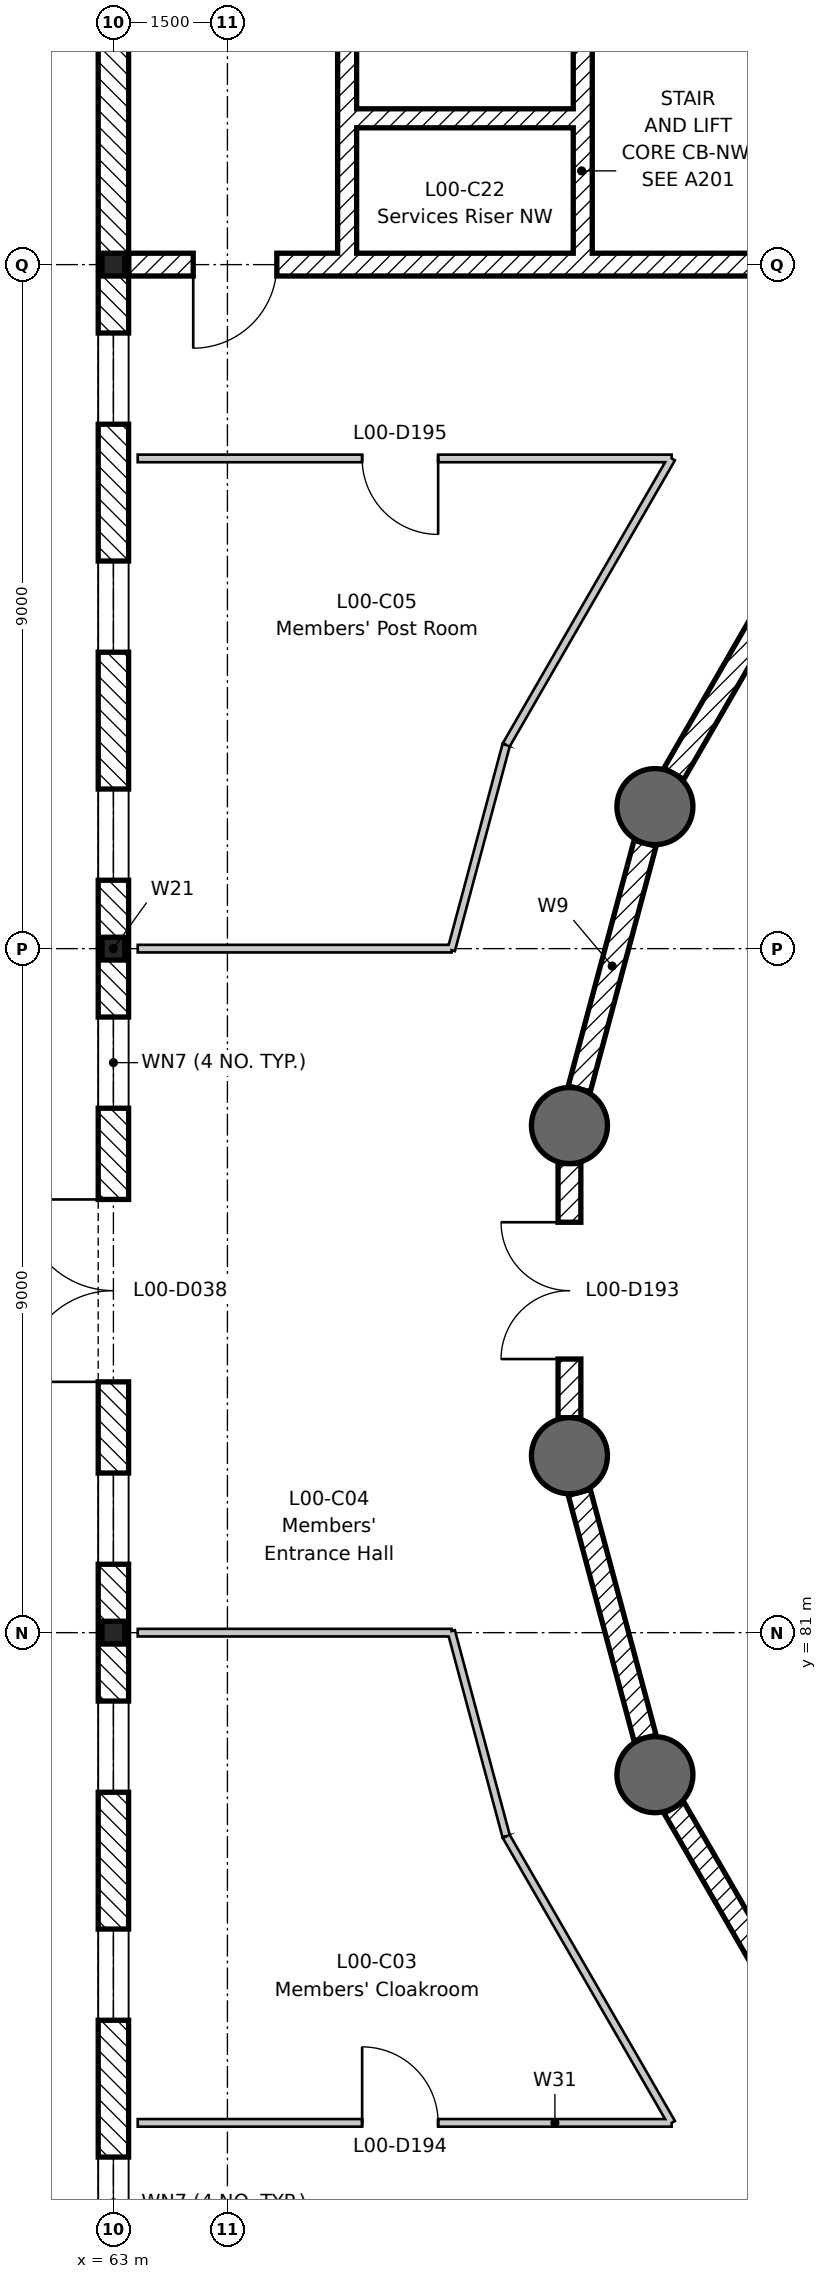
"""IFC4 building model, lengths in metres.
Left out: names, types, materials, properties, quantities, classifications, styles, units other than length and angle.
Written with IfcOpenShell. Run it as: python <this file> out.ifc"""

import sys

from ifc_helpers import new_model, si_unit, direction, frame, frame_2d, origin, origin_2d, place, context, subcontext, project, spatial, rectangle, circle, i_section, extrude, element, fill, save


model = new_model("IFC4")
c1 = context("Model", 3, precision=1e-05, world=origin(), true_north=direction((0.0, 1.0)))
c2 = subcontext(c1, "Body", "Model", "MODEL_VIEW")
j1 = project(units=[si_unit("LENGTHUNIT", "METRE"), si_unit("PLANEANGLEUNIT", "RADIAN")], contexts=[c1])
p1 = place(None, origin())
s1 = spatial("IfcSite", under=j1, at=p1, CompositionType="ELEMENT")
p2 = place(p1, origin())
s2 = spatial("IfcBuilding", under=s1, at=p2, CompositionType="ELEMENT")
p3 = place(p2, origin())
s3 = spatial("IfcBuildingStorey", under=s2, at=p3, CompositionType="ELEMENT", Elevation=0.0)
for number, where, z_axis, x_axis in (
    (1, (70.125, 91.869, -0.6), (0.0, 0.0, 1.0), (1.0, 0.0, 0.0)),
    (2, (69.0, 87.672, -0.6), (0.0, 0.0, 1.0), (1.0, 0.0, 0.0)),
    (3, (69.0, 83.328, -0.6), (0.0, 0.0, 1.0), (1.0, 0.0, 0.0)),
    (4, (70.125, 79.131, -0.6), (0.0, 0.0, 1.0), (1.0, 0.0, 0.0)),
):
    element("IfcColumn", number, at=place(p3, frame(where, z_axis=z_axis, x_axis=x_axis)), inside=s3, PredefinedType="COLUMN", context=c2, shape_type="SweptSolid", body=[
        extrude(circle(Radius=0.5, at=origin_2d()), origin(), (0.0, 0.0, 1.0), 5.8),
    ])
for number, where, z_axis, x_axis in (
    (5, (63.0, 81.0, -0.6), (0.0, 0.0, 1.0), (1.0, 0.0, 0.0)),
    (6, (63.0, 90.0, -0.6), (0.0, 0.0, 1.0), (1.0, 0.0, 0.0)),
    (7, (63.0, 99.0, -0.6), (0.0, 0.0, 1.0), (1.0, 0.0, 0.0)),
):
    element("IfcColumn", number, at=place(p3, frame(where, z_axis=z_axis, x_axis=x_axis)), inside=s3, PredefinedType="COLUMN", context=c2, shape_type="SweptSolid", body=[
        extrude(i_section(OverallWidth=0.3, OverallDepth=0.3, WebThickness=0.011, FlangeThickness=0.019, FilletRadius=0.027, at=origin_2d()), origin(), (0.0, 0.0, 1.0), 5.8),
    ])
for number, where, z_axis, x_axis in (
    (8, (72.047, 95.198, 0.0), (0.0, 0.0, 1.0), (-0.5, -0.866, 0.0)),
    (9, (69.995, 91.386, 0.0), (0.0, 0.0, 1.0), (-0.259, -0.966, 0.0)),
):
    element("IfcWall", number, at=place(p3, frame(where, z_axis=z_axis, x_axis=x_axis)), inside=s3, PredefinedType="PARTITIONING", context=c2, shape_type="SweptSolid", body=[
        extrude(rectangle(XDim=3.344, YDim=0.3, at=frame_2d((1.672, 0.0))), origin(), (0.0, 0.0, 1.0), 4.91),
    ])
p4 = place(p3, frame((69.0, 87.172, 0.0), z_axis=(0.0, 0.0, 1.0), x_axis=(0.0, -1.0, 0.0)))
e10 = element("IfcWall", 10, at=p4, inside=s3, PredefinedType="PARTITIONING", context=c2, shape_type="SweptSolid", body=[
    extrude(rectangle(XDim=3.345, YDim=0.3, at=frame_2d((1.672, 0.0))), origin(), (0.0, 0.0, 1.0), 4.91),
])
p5 = place(p4, frame((0.772, 0.0, 0.0)))
e11 = element("IfcOpeningElement", 11, at=p5, cuts=e10, PredefinedType="OPENING", context=c2, shape_type="SweptSolid", body=[
    extrude(rectangle(XDim=1.8, YDim=2.4, at=frame_2d((0.9, 1.2))), frame((0.0, 0.16, 0.0), z_axis=(0.0, -1.0, 0.0), x_axis=(1.0, 0.0, 0.0)), (0.0, 0.0, 1.0), 0.32),
])
for number, where, z_axis, x_axis in (
    (12, (69.129, 82.845, 0.0), (0.0, 0.0, 1.0), (0.259, -0.966, 0.0)),
    (13, (70.375, 78.698, 0.0), (0.0, 0.0, 1.0), (0.5, -0.866, 0.0)),
):
    element("IfcWall", number, at=place(p3, frame(where, z_axis=z_axis, x_axis=x_axis)), inside=s3, PredefinedType="PARTITIONING", context=c2, shape_type="SweptSolid", body=[
        extrude(rectangle(XDim=3.344, YDim=0.3, at=frame_2d((1.672, 0.0))), origin(), (0.0, 0.0, 1.0), 4.91),
    ])
p6 = place(p3, frame((63.2, 99.0, 0.0), z_axis=(0.0, 0.0, 1.0), x_axis=(1.0, 0.0, 0.0)))
e14 = element("IfcWall", 14, at=p6, inside=s3, PredefinedType="SHEAR", context=c2, shape_type="SweptSolid", body=[
    extrude(rectangle(XDim=8.95, YDim=0.3, at=frame_2d((4.475, 0.0))), origin(), (0.0, 0.0, 1.0), 5.2),
])
p7 = place(p6, frame((0.85, 0.0, 0.0)))
e15 = element("IfcOpeningElement", 15, at=p7, cuts=e14, PredefinedType="OPENING", context=c2, shape_type="SweptSolid", body=[
    extrude(rectangle(XDim=1.1, YDim=2.1, at=frame_2d((0.55, 1.05))), frame((0.0, 0.16, 0.0), z_axis=(0.0, -1.0, 0.0), x_axis=(1.0, 0.0, 0.0)), (0.0, 0.0, 1.0), 0.32),
])
p8 = place(p3, frame((66.075, 107.8, 0.0), z_axis=(0.0, 0.0, 1.0), x_axis=(0.0, -1.0, 0.0)))
e16 = element("IfcWall", 16, at=p8, inside=s3, PredefinedType="SHEAR", context=c2, shape_type="SweptSolid", body=[
    extrude(rectangle(XDim=8.65, YDim=0.25, at=frame_2d((4.325, 0.0))), origin(), (0.0, 0.0, 1.0), 5.2),
])
p9 = place(p8, frame((0.4, 0.0, 0.0)))
e17 = element("IfcOpeningElement", 17, at=p9, cuts=e16, PredefinedType="OPENING", context=c2, shape_type="SweptSolid", body=[
    extrude(rectangle(XDim=1.0, YDim=2.1, at=frame_2d((0.5, 1.05))), frame((0.0, 0.135, 0.0), z_axis=(0.0, -1.0, 0.0), x_axis=(1.0, 0.0, 0.0)), (0.0, 0.0, 1.0), 0.27),
])
p10 = place(p3, frame((69.175, 107.8, 0.0), z_axis=(0.0, 0.0, 1.0), x_axis=(0.0, -1.0, 0.0)))
e18 = element("IfcWall", 18, at=p10, inside=s3, PredefinedType="SHEAR", context=c2, shape_type="SweptSolid", body=[
    extrude(rectangle(XDim=8.65, YDim=0.25, at=frame_2d((4.325, 0.0))), origin(), (0.0, 0.0, 1.0), 5.2),
])
p11 = place(p3, frame((66.2, 100.925, 0.0), z_axis=(0.0, 0.0, 1.0), x_axis=(1.0, 0.0, 0.0)))
e19 = element("IfcWall", 19, at=p11, inside=s3, PredefinedType="SHEAR", context=c2, shape_type="SweptSolid", body=[
    extrude(rectangle(XDim=2.85, YDim=0.25, at=frame_2d((1.425, 0.0))), origin(), (0.0, 0.0, 1.0), 5.2),
])
p12 = place(p3, frame((63.0, 72.0, 0.0), z_axis=(0.0, 0.0, 1.0), x_axis=(0.0, 1.0, 0.0)))
e20 = element("IfcWall", 20, at=p12, inside=s3, PredefinedType="STANDARD", context=c2, shape_type="SweptSolid", body=[
    extrude(rectangle(XDim=27.0, YDim=0.4, at=frame_2d((13.5, 0.0))), origin(), (0.0, 0.0, 1.0), 4.71),
])
p13 = place(p12, frame((12.3, 0.0, 0.0)))
e21 = element("IfcOpeningElement", 21, at=p13, cuts=e20, PredefinedType="OPENING", context=c2, shape_type="SweptSolid", body=[
    extrude(rectangle(XDim=2.4, YDim=2.4, at=frame_2d((1.2, 1.2))), frame((0.0, 0.21, 0.0), z_axis=(0.0, -1.0, 0.0), x_axis=(1.0, 0.0, 0.0)), (0.0, 0.0, 1.0), 0.42),
])
p14 = place(p12, frame((0.9, 0.0, 0.9)))
e22 = element("IfcOpeningElement", 22, at=p14, cuts=e20, PredefinedType="OPENING", context=c2, shape_type="SweptSolid", body=[
    extrude(rectangle(XDim=1.2, YDim=2.4, at=frame_2d((0.6, 1.2))), frame((0.0, 0.21, 0.0), z_axis=(0.0, -1.0, 0.0), x_axis=(1.0, 0.0, 0.0)), (0.0, 0.0, 1.0), 0.42),
])
p15 = place(p12, frame((3.9, 0.0, 0.9)))
e23 = element("IfcOpeningElement", 23, at=p15, cuts=e20, PredefinedType="OPENING", context=c2, shape_type="SweptSolid", body=[
    extrude(rectangle(XDim=1.2, YDim=2.4, at=frame_2d((0.6, 1.2))), frame((0.0, 0.21, 0.0), z_axis=(0.0, -1.0, 0.0), x_axis=(1.0, 0.0, 0.0)), (0.0, 0.0, 1.0), 0.42),
])
p16 = place(p12, frame((6.9, 0.0, 0.9)))
e24 = element("IfcOpeningElement", 24, at=p16, cuts=e20, PredefinedType="OPENING", context=c2, shape_type="SweptSolid", body=[
    extrude(rectangle(XDim=1.2, YDim=2.4, at=frame_2d((0.6, 1.2))), frame((0.0, 0.21, 0.0), z_axis=(0.0, -1.0, 0.0), x_axis=(1.0, 0.0, 0.0)), (0.0, 0.0, 1.0), 0.42),
])
p17 = place(p12, frame((9.9, 0.0, 0.9)))
e25 = element("IfcOpeningElement", 25, at=p17, cuts=e20, PredefinedType="OPENING", context=c2, shape_type="SweptSolid", body=[
    extrude(rectangle(XDim=1.2, YDim=2.4, at=frame_2d((0.6, 1.2))), frame((0.0, 0.21, 0.0), z_axis=(0.0, -1.0, 0.0), x_axis=(1.0, 0.0, 0.0)), (0.0, 0.0, 1.0), 0.42),
])
p18 = place(p12, frame((15.9, 0.0, 0.9)))
e26 = element("IfcOpeningElement", 26, at=p18, cuts=e20, PredefinedType="OPENING", context=c2, shape_type="SweptSolid", body=[
    extrude(rectangle(XDim=1.2, YDim=2.4, at=frame_2d((0.6, 1.2))), frame((0.0, 0.21, 0.0), z_axis=(0.0, -1.0, 0.0), x_axis=(1.0, 0.0, 0.0)), (0.0, 0.0, 1.0), 0.42),
])
p19 = place(p12, frame((18.9, 0.0, 0.9)))
e27 = element("IfcOpeningElement", 27, at=p19, cuts=e20, PredefinedType="OPENING", context=c2, shape_type="SweptSolid", body=[
    extrude(rectangle(XDim=1.2, YDim=2.4, at=frame_2d((0.6, 1.2))), frame((0.0, 0.21, 0.0), z_axis=(0.0, -1.0, 0.0), x_axis=(1.0, 0.0, 0.0)), (0.0, 0.0, 1.0), 0.42),
])
p20 = place(p12, frame((21.9, 0.0, 0.9)))
e28 = element("IfcOpeningElement", 28, at=p20, cuts=e20, PredefinedType="OPENING", context=c2, shape_type="SweptSolid", body=[
    extrude(rectangle(XDim=1.2, YDim=2.4, at=frame_2d((0.6, 1.2))), frame((0.0, 0.21, 0.0), z_axis=(0.0, -1.0, 0.0), x_axis=(1.0, 0.0, 0.0)), (0.0, 0.0, 1.0), 0.42),
])
p21 = place(p12, frame((24.9, 0.0, 0.9)))
e29 = element("IfcOpeningElement", 29, at=p21, cuts=e20, PredefinedType="OPENING", context=c2, shape_type="SweptSolid", body=[
    extrude(rectangle(XDim=1.2, YDim=2.4, at=frame_2d((0.6, 1.2))), frame((0.0, 0.21, 0.0), z_axis=(0.0, -1.0, 0.0), x_axis=(1.0, 0.0, 0.0)), (0.0, 0.0, 1.0), 0.42),
])
p22 = place(p3, frame((63.0, 99.0, 0.0), z_axis=(0.0, 0.0, 1.0), x_axis=(0.0, 1.0, 0.0)))
e30 = element("IfcWall", 30, at=p22, inside=s3, PredefinedType="STANDARD", context=c2, shape_type="SweptSolid", body=[
    extrude(rectangle(XDim=4.4, YDim=0.4, at=frame_2d((2.2, 0.0))), origin(), (0.0, 0.0, 1.0), 5.2),
])
p23 = place(p3, frame((67.45, 81.0, 0.0), z_axis=(0.0, 0.0, 1.0), x_axis=(-1.0, 0.0, 0.0)))
e31 = element("IfcWall", 31, at=p23, inside=s3, PredefinedType="PARTITIONING", context=c2, shape_type="SweptSolid", body=[
    extrude(rectangle(XDim=4.13, YDim=0.1, at=frame_2d((2.065, 0.0))), origin(), (0.0, 0.0, 1.0), 4.71),
])
p24 = place(p3, frame((63.32, 74.55, 0.0), z_axis=(0.0, 0.0, 1.0), x_axis=(1.0, 0.0, 0.0)))
e32 = element("IfcWall", 32, at=p24, inside=s3, PredefinedType="PARTITIONING", context=c2, shape_type="SweptSolid", body=[
    extrude(rectangle(XDim=7.024, YDim=0.1, at=frame_2d((3.512, 0.0))), origin(), (0.0, 0.0, 1.0), 4.71),
])
p25 = place(p24, frame((2.952, 0.0, 0.0)))
e33 = element("IfcOpeningElement", 33, at=p25, cuts=e32, PredefinedType="OPENING", context=c2, shape_type="SweptSolid", body=[
    extrude(rectangle(XDim=1.0, YDim=2.1, at=frame_2d((0.5, 1.05))), frame((0.0, 0.06, 0.0), z_axis=(0.0, -1.0, 0.0), x_axis=(1.0, 0.0, 0.0)), (0.0, 0.0, 1.0), 0.12),
])
p26 = place(p3, frame((70.344, 74.55, 0.0), z_axis=(0.0, 0.0, 1.0), x_axis=(-0.499992644437, 0.866029650479, 0.0)))
e34 = element("IfcWall", 34, at=p26, inside=s3, PredefinedType="PARTITIONING", context=c2, shape_type="SweptSolid", body=[
    extrude(rectangle(XDim=4.354, YDim=0.1, at=frame_2d((2.177, 0.0))), origin(), (0.0, 0.0, 1.0), 4.71),
])
p27 = place(p3, frame((68.167, 78.321, 0.0), z_axis=(0.0, 0.0, 1.0), x_axis=(-0.258782667083, 0.965935573016, 0.0)))
e35 = element("IfcWall", 35, at=p27, inside=s3, PredefinedType="PARTITIONING", context=c2, shape_type="SweptSolid", body=[
    extrude(rectangle(XDim=2.794, YDim=0.1, at=frame_2d((1.397, 0.0))), origin(), (0.0, 0.0, 1.0), 4.71),
])
p28 = place(p3, frame((67.45, 90.0, 0.0), z_axis=(0.0, 0.0, 1.0), x_axis=(-1.0, 0.0, 0.0)))
e36 = element("IfcWall", 36, at=p28, inside=s3, PredefinedType="PARTITIONING", context=c2, shape_type="SweptSolid", body=[
    extrude(rectangle(XDim=4.13, YDim=0.1, at=frame_2d((2.065, 0.0))), origin(), (0.0, 0.0, 1.0), 4.71),
])
p29 = place(p3, frame((67.444, 89.98, 0.0), z_axis=(0.0, 0.0, 1.0), x_axis=(0.258782667083, 0.965935573016, 0.0)))
e37 = element("IfcWall", 37, at=p29, inside=s3, PredefinedType="PARTITIONING", context=c2, shape_type="SweptSolid", body=[
    extrude(rectangle(XDim=2.794, YDim=0.1, at=frame_2d((1.397, 0.0))), origin(), (0.0, 0.0, 1.0), 4.71),
])
p30 = place(p3, frame((68.167, 92.679, 0.0), z_axis=(0.0, 0.0, 1.0), x_axis=(0.499992644437, 0.866029650479, 0.0)))
e38 = element("IfcWall", 38, at=p30, inside=s3, PredefinedType="PARTITIONING", context=c2, shape_type="SweptSolid", body=[
    extrude(rectangle(XDim=4.354, YDim=0.1, at=frame_2d((2.177, 0.0))), origin(), (0.0, 0.0, 1.0), 4.71),
])
p31 = place(p3, frame((70.344, 96.45, 0.0), z_axis=(0.0, 0.0, 1.0), x_axis=(-1.0, 0.0, 0.0)))
e39 = element("IfcWall", 39, at=p31, inside=s3, PredefinedType="PARTITIONING", context=c2, shape_type="SweptSolid", body=[
    extrude(rectangle(XDim=7.024, YDim=0.1, at=frame_2d((3.512, 0.0))), origin(), (0.0, 0.0, 1.0), 4.71),
])
p32 = place(p31, frame((3.072, 0.0, 0.0)))
e40 = element("IfcOpeningElement", 40, at=p32, cuts=e39, PredefinedType="OPENING", context=c2, shape_type="SweptSolid", body=[
    extrude(rectangle(XDim=1.0, YDim=2.1, at=frame_2d((0.5, 1.05))), frame((0.0, 0.06, 0.0), z_axis=(0.0, -1.0, 0.0), x_axis=(1.0, 0.0, 0.0)), (0.0, 0.0, 1.0), 0.12),
])
p33 = place(p13, origin())
e41 = element("IfcDoor", 41, at=p33, inside=s3, OperationType="DOUBLE_DOOR_SINGLE_SWING", PredefinedType="DOOR", context=c2, shape_type="SweptSolid", body=[
    extrude(rectangle(XDim=2.4, YDim=2.4, at=frame_2d((1.2, 1.2))), frame((0.0, 0.025, 0.0), z_axis=(0.0, -1.0, 0.0), x_axis=(1.0, 0.0, 0.0)), (0.0, 0.0, 1.0), 0.05),
])
fill(e21, e41)
p34 = place(p14, origin())
e42 = element("IfcWindow", 42, at=p34, inside=s3, PartitioningType="SINGLE_PANEL", PredefinedType="WINDOW", context=c2, shape_type="SweptSolid", body=[
    extrude(rectangle(XDim=1.2, YDim=2.4, at=frame_2d((0.6, 1.2))), frame((0.0, 0.03, 0.0), z_axis=(0.0, -1.0, 0.0), x_axis=(1.0, 0.0, 0.0)), (0.0, 0.0, 1.0), 0.06),
])
fill(e22, e42)
p35 = place(p15, origin())
e43 = element("IfcWindow", 43, at=p35, inside=s3, PartitioningType="SINGLE_PANEL", PredefinedType="WINDOW", context=c2, shape_type="SweptSolid", body=[
    extrude(rectangle(XDim=1.2, YDim=2.4, at=frame_2d((0.6, 1.2))), frame((0.0, 0.03, 0.0), z_axis=(0.0, -1.0, 0.0), x_axis=(1.0, 0.0, 0.0)), (0.0, 0.0, 1.0), 0.06),
])
fill(e23, e43)
p36 = place(p16, origin())
e44 = element("IfcWindow", 44, at=p36, inside=s3, PartitioningType="SINGLE_PANEL", PredefinedType="WINDOW", context=c2, shape_type="SweptSolid", body=[
    extrude(rectangle(XDim=1.2, YDim=2.4, at=frame_2d((0.6, 1.2))), frame((0.0, 0.03, 0.0), z_axis=(0.0, -1.0, 0.0), x_axis=(1.0, 0.0, 0.0)), (0.0, 0.0, 1.0), 0.06),
])
fill(e24, e44)
p37 = place(p17, origin())
e45 = element("IfcWindow", 45, at=p37, inside=s3, PartitioningType="SINGLE_PANEL", PredefinedType="WINDOW", context=c2, shape_type="SweptSolid", body=[
    extrude(rectangle(XDim=1.2, YDim=2.4, at=frame_2d((0.6, 1.2))), frame((0.0, 0.03, 0.0), z_axis=(0.0, -1.0, 0.0), x_axis=(1.0, 0.0, 0.0)), (0.0, 0.0, 1.0), 0.06),
])
fill(e25, e45)
p38 = place(p18, origin())
e46 = element("IfcWindow", 46, at=p38, inside=s3, PartitioningType="SINGLE_PANEL", PredefinedType="WINDOW", context=c2, shape_type="SweptSolid", body=[
    extrude(rectangle(XDim=1.2, YDim=2.4, at=frame_2d((0.6, 1.2))), frame((0.0, 0.03, 0.0), z_axis=(0.0, -1.0, 0.0), x_axis=(1.0, 0.0, 0.0)), (0.0, 0.0, 1.0), 0.06),
])
fill(e26, e46)
p39 = place(p19, origin())
e47 = element("IfcWindow", 47, at=p39, inside=s3, PartitioningType="SINGLE_PANEL", PredefinedType="WINDOW", context=c2, shape_type="SweptSolid", body=[
    extrude(rectangle(XDim=1.2, YDim=2.4, at=frame_2d((0.6, 1.2))), frame((0.0, 0.03, 0.0), z_axis=(0.0, -1.0, 0.0), x_axis=(1.0, 0.0, 0.0)), (0.0, 0.0, 1.0), 0.06),
])
fill(e27, e47)
p40 = place(p20, origin())
e48 = element("IfcWindow", 48, at=p40, inside=s3, PartitioningType="SINGLE_PANEL", PredefinedType="WINDOW", context=c2, shape_type="SweptSolid", body=[
    extrude(rectangle(XDim=1.2, YDim=2.4, at=frame_2d((0.6, 1.2))), frame((0.0, 0.03, 0.0), z_axis=(0.0, -1.0, 0.0), x_axis=(1.0, 0.0, 0.0)), (0.0, 0.0, 1.0), 0.06),
])
fill(e28, e48)
p41 = place(p21, origin())
e49 = element("IfcWindow", 49, at=p41, inside=s3, PartitioningType="SINGLE_PANEL", PredefinedType="WINDOW", context=c2, shape_type="SweptSolid", body=[
    extrude(rectangle(XDim=1.2, YDim=2.4, at=frame_2d((0.6, 1.2))), frame((0.0, 0.03, 0.0), z_axis=(0.0, -1.0, 0.0), x_axis=(1.0, 0.0, 0.0)), (0.0, 0.0, 1.0), 0.06),
])
fill(e29, e49)
p42 = place(p7, frame((1.1, 0.0, 0.0), z_axis=(0.0, 0.0, 1.0), x_axis=(-1.0, 0.0, 0.0)))
e50 = element("IfcDoor", 50, at=p42, inside=s3, OperationType="SINGLE_SWING_RIGHT", PredefinedType="DOOR", context=c2, shape_type="SweptSolid", body=[
    extrude(rectangle(XDim=1.1, YDim=2.1, at=frame_2d((0.55, 1.05))), frame((0.0, 0.025, 0.0), z_axis=(0.0, -1.0, 0.0), x_axis=(1.0, 0.0, 0.0)), (0.0, 0.0, 1.0), 0.05),
])
fill(e15, e50)
p43 = place(p5, frame((1.8, 0.0, 0.0), z_axis=(0.0, 0.0, 1.0), x_axis=(-1.0, 0.0, 0.0)))
e51 = element("IfcDoor", 51, at=p43, inside=s3, OperationType="DOUBLE_DOOR_SINGLE_SWING", PredefinedType="DOOR", context=c2, shape_type="SweptSolid", body=[
    extrude(rectangle(XDim=1.8, YDim=2.4, at=frame_2d((0.9, 1.2))), frame((0.0, 0.025, 0.0), z_axis=(0.0, -1.0, 0.0), x_axis=(1.0, 0.0, 0.0)), (0.0, 0.0, 1.0), 0.05),
])
fill(e11, e51)
p44 = place(p25, origin())
e52 = element("IfcDoor", 52, at=p44, inside=s3, OperationType="SINGLE_SWING_LEFT", PredefinedType="DOOR", context=c2, shape_type="SweptSolid", body=[
    extrude(rectangle(XDim=1.0, YDim=2.1, at=frame_2d((0.5, 1.05))), frame((0.0, 0.025, 0.0), z_axis=(0.0, -1.0, 0.0), x_axis=(1.0, 0.0, 0.0)), (0.0, 0.0, 1.0), 0.05),
])
fill(e33, e52)
p45 = place(p32, origin())
e53 = element("IfcDoor", 53, at=p45, inside=s3, OperationType="SINGLE_SWING_LEFT", PredefinedType="DOOR", context=c2, shape_type="SweptSolid", body=[
    extrude(rectangle(XDim=1.0, YDim=2.1, at=frame_2d((0.5, 1.05))), frame((0.0, 0.025, 0.0), z_axis=(0.0, -1.0, 0.0), x_axis=(1.0, 0.0, 0.0)), (0.0, 0.0, 1.0), 0.05),
])
fill(e40, e53)
save(model, sys.argv[1])
